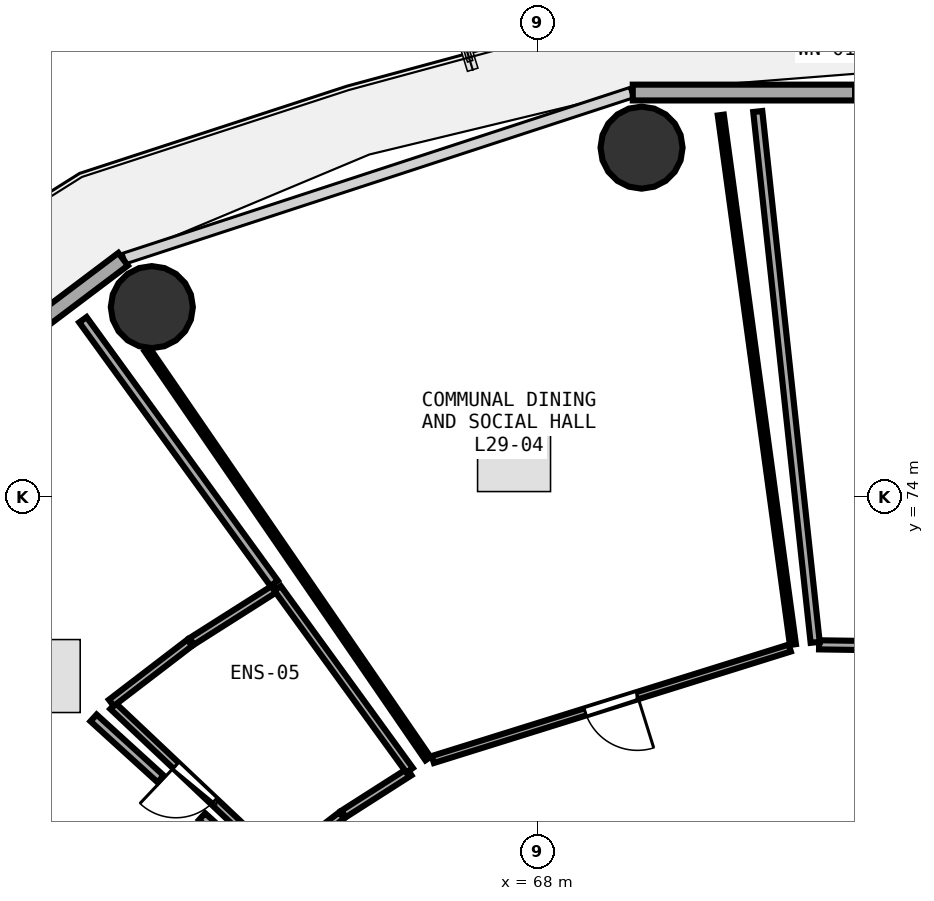
"""IFC4 building model, lengths in metres.
Left out: names, types, materials, properties, quantities, classifications, styles, units other than length and angle.
Written with IfcOpenShell. Run it as: python <this file> out.ifc"""

import sys

from ifc_helpers import new_model, si_unit, direction, frame, frame_2d, origin, origin_2d, place, context, subcontext, project, spatial, rectangle, circle, extrude, element, fill, save


model = new_model("IFC4")
c1 = context("Model", 3, precision=1e-05, world=origin(), true_north=direction((0.0, 1.0)))
c2 = subcontext(c1, "Body", "Model", "MODEL_VIEW")
j1 = project(units=[si_unit("LENGTHUNIT", "METRE"), si_unit("PLANEANGLEUNIT", "RADIAN")], contexts=[c1])
p1 = place(None, origin())
s1 = spatial("IfcSite", under=j1, at=p1, CompositionType="ELEMENT")
p2 = place(p1, origin())
s2 = spatial("IfcBuilding", under=s1, at=p2, CompositionType="ELEMENT")
p3 = place(p2, frame((0.0, 0.0, 113.85)))
s3 = spatial("IfcBuildingStorey", under=s2, at=p3, CompositionType="ELEMENT", Elevation=113.85)
for number, where, z_axis, x_axis in (
    (1, (69.714, 79.745, 0.0), (0.0, 0.0, 1.0), (1.0, 0.0, 0.0)),
    (2, (61.66, 77.122, 0.0), (0.0, 0.0, 1.0), (1.0, 0.0, 0.0)),
):
    element("IfcColumn", number, at=place(p3, frame(where, z_axis=z_axis, x_axis=x_axis)), inside=s3, PredefinedType="COLUMN", context=c2, shape_type="SweptSolid", body=[
        extrude(circle(Radius=0.675, at=origin_2d()), origin(), (0.0, 0.0, 1.0), 3.75),
    ])
p4 = place(p3, frame((78.43, 80.651, 0.0), z_axis=(0.0, 0.0, 1.0), x_axis=(-1.0, 0.0, 0.0)))
e3 = element("IfcWall", 3, at=p4, inside=s3, PredefinedType="SOLIDWALL", context=c2, shape_type="SweptSolid", body=[
    extrude(rectangle(XDim=8.861, YDim=0.26, at=frame_2d((4.43, 0.0))), origin(), (0.0, 0.0, 1.0), 3.475),
])
p5 = place(p4, frame((3.63, 0.0, 0.85)))
e4 = element("IfcOpeningElement", 4, at=p5, cuts=e3, PredefinedType="OPENING", context=c2, shape_type="SweptSolid", body=[
    extrude(rectangle(XDim=1.6, YDim=1.45, at=frame_2d((0.8, 0.725))), frame((0.0, 0.14, 0.0), z_axis=(0.0, -1.0, 0.0), x_axis=(1.0, 0.0, 0.0)), (0.0, 0.0, 1.0), 0.28),
])
p6 = place(p3, frame((61.188, 77.91, 0.0), z_axis=(0.0, 0.0, 1.0), x_axis=(-0.798501507879, -0.601992808857, 0.0)))
e5 = element("IfcWall", 5, at=p6, inside=s3, PredefinedType="SOLIDWALL", context=c2, shape_type="SweptSolid", body=[
    extrude(rectangle(XDim=8.499, YDim=0.26, at=frame_2d((4.25, 0.0))), origin(), (0.0, 0.0, 1.0), 3.475),
])
p7 = place(p6, frame((3.45, 0.0, 0.85)))
e6 = element("IfcOpeningElement", 6, at=p7, cuts=e5, PredefinedType="OPENING", context=c2, shape_type="SweptSolid", body=[
    extrude(rectangle(XDim=1.6, YDim=1.45, at=frame_2d((0.8, 0.725))), frame((0.0, 0.14, 0.0), z_axis=(0.0, -1.0, 0.0), x_axis=(1.0, 0.0, 0.0)), (0.0, 0.0, 1.0), 0.28),
])
p8 = place(p3, frame((75.856, 71.52, 0.0), z_axis=(0.0, 0.0, 1.0), x_axis=(-0.999888601473, 0.014925972152, 0.0)))
e7 = element("IfcWall", 7, at=p8, inside=s3, PredefinedType="PARTITIONING", context=c2, shape_type="SweptSolid", body=[
    extrude(rectangle(XDim=3.222, YDim=0.15, at=frame_2d((1.611, 0.0))), origin(), (0.0, 0.0, 1.0), 3.48),
])
p9 = place(p8, frame((1.136, 0.0, 0.0)))
e8 = element("IfcOpeningElement", 8, at=p9, cuts=e7, PredefinedType="OPENING", context=c2, shape_type="SweptSolid", body=[
    extrude(rectangle(XDim=0.95, YDim=2.08, at=frame_2d((0.475, 1.04))), frame((0.0, 0.085, 0.0), z_axis=(0.0, -1.0, 0.0), x_axis=(1.0, 0.0, 0.0)), (0.0, 0.0, 1.0), 0.17),
])
p10 = place(p3, frame((72.152, 71.515, 0.0), z_axis=(0.0, 0.0, 1.0), x_axis=(-0.954537176379, -0.298091896753, 0.0)))
e9 = element("IfcWall", 9, at=p10, inside=s3, PredefinedType="PARTITIONING", context=c2, shape_type="SweptSolid", body=[
    extrude(rectangle(XDim=6.15, YDim=0.12, at=frame_2d((3.075, 0.0))), origin(), (0.0, 0.0, 1.0), 2.925),
])
p11 = place(p10, frame((2.625, 0.0, 0.0)))
e10 = element("IfcOpeningElement", 10, at=p11, cuts=e9, PredefinedType="OPENING", context=c2, shape_type="SweptSolid", body=[
    extrude(rectangle(XDim=0.9, YDim=2.08, at=frame_2d((0.45, 1.04))), frame((0.0, 0.07, 0.0), z_axis=(0.0, -1.0, 0.0), x_axis=(1.0, 0.0, 0.0)), (0.0, 0.0, 1.0), 0.14),
])
p12 = place(p3, frame((63.714, 68.017, 0.0), z_axis=(0.0, 0.0, 1.0), x_axis=(-0.726954661445, 0.686685459438, 0.0)))
e11 = element("IfcWall", 11, at=p12, inside=s3, PredefinedType="PLUMBINGWALL", context=c2, shape_type="SweptSolid", body=[
    extrude(rectangle(XDim=3.704, YDim=0.13, at=frame_2d((1.852, 0.0))), origin(), (0.0, 0.0, 1.0), 3.175),
])
p13 = place(p12, frame((1.422, 0.0, 0.0)))
e12 = element("IfcOpeningElement", 12, at=p13, cuts=e11, PredefinedType="OPENING", context=c2, shape_type="SweptSolid", body=[
    extrude(rectangle(XDim=0.86, YDim=2.05, at=frame_2d((0.43, 1.025))), frame((0.0, 0.075, 0.0), z_axis=(0.0, -1.0, 0.0), x_axis=(1.0, 0.0, 0.0)), (0.0, 0.0, 1.0), 0.15),
])
p14 = place(p3, frame((72.57, 71.609, 0.0), z_axis=(0.0, 0.0, 1.0), x_axis=(-0.107541262508, 0.994200622037, 0.0)))
e13 = element("IfcWall", 13, at=p14, inside=s3, PredefinedType="PARTITIONING", context=c2, shape_type="SweptSolid", body=[
    extrude(rectangle(XDim=8.781, YDim=0.15, at=frame_2d((4.391, 0.0))), origin(), (0.0, 0.0, 1.0), 2.975),
])
p15 = place(p3, frame((66.201, 69.697, 0.0), z_axis=(0.0, 0.0, 1.0), x_axis=(-0.566050189738, 0.824370779866, 0.0)))
e14 = element("IfcWall", 14, at=p15, inside=s3, PredefinedType="PARTITIONING", context=c2, shape_type="SweptSolid", body=[
    extrude(rectangle(XDim=8.163, YDim=0.1, at=frame_2d((4.082, 0.0))), origin(), (0.0, 0.0, 1.0), 2.925),
])
p16 = place(p3, frame((71.017, 80.281, 0.0), z_axis=(0.0, 0.0, 1.0), x_axis=(0.134981799135, -0.990848078114, 0.0)))
e15 = element("IfcWall", 15, at=p16, inside=s3, PredefinedType="PARTITIONING", context=c2, shape_type="SweptSolid", body=[
    extrude(rectangle(XDim=8.788, YDim=0.1, at=frame_2d((4.394, 0.0))), origin(), (0.0, 0.0, 1.0), 2.975),
])
p17 = place(p3, frame((65.895, 69.477, 0.0), z_axis=(0.0, 0.0, 1.0), x_axis=(-0.842782601573, -0.538254109586, 0.0)))
e16 = element("IfcWall", 16, at=p17, inside=s3, PredefinedType="PLUMBINGWALL", context=c2, shape_type="SweptSolid", body=[
    extrude(rectangle(XDim=1.283, YDim=0.13, at=frame_2d((0.641, 0.0))), origin(), (0.0, 0.0, 1.0), 2.925),
])
p18 = place(p3, frame((64.781, 68.764, 0.0), z_axis=(0.0, 0.0, 1.0), x_axis=(-0.792402667756, -0.609998370599, 0.0)))
e17 = element("IfcWall", 17, at=p18, inside=s3, PredefinedType="PLUMBINGWALL", context=c2, shape_type="SweptSolid", body=[
    extrude(rectangle(XDim=1.271, YDim=0.13, at=frame_2d((0.636, 0.0))), origin(), (0.0, 0.0, 1.0), 2.925),
])
p19 = place(p3, frame((60.994, 70.614, 0.0), z_axis=(0.0, 0.0, 1.0), x_axis=(0.793879690019, 0.608074861982, 0.0)))
e18 = element("IfcWall", 18, at=p19, inside=s3, PredefinedType="PLUMBINGWALL", context=c2, shape_type="SweptSolid", body=[
    extrude(rectangle(XDim=1.624, YDim=0.13, at=frame_2d((0.812, 0.0))), origin(), (0.0, 0.0, 1.0), 3.175),
])
p20 = place(p3, frame((62.316, 71.625, 0.0), z_axis=(0.0, 0.0, 1.0), x_axis=(0.844446099651, 0.535640536913, 0.0)))
e19 = element("IfcWall", 19, at=p20, inside=s3, PredefinedType="PLUMBINGWALL", context=c2, shape_type="SweptSolid", body=[
    extrude(rectangle(XDim=1.638, YDim=0.13, at=frame_2d((0.819, 0.0))), origin(), (0.0, 0.0, 1.0), 2.925),
])
p21 = place(p3, frame((63.728, 72.497, 0.0), z_axis=(0.0, 0.0, 1.0), x_axis=(0.587484552708, -0.809235380053, 0.0)))
e20 = element("IfcWall", 20, at=p21, inside=s3, PredefinedType="PLUMBINGWALL", context=c2, shape_type="SweptSolid", body=[
    extrude(rectangle(XDim=3.698, YDim=0.13, at=frame_2d((1.849, 0.0))), origin(), (0.0, 0.0, 1.0), 3.175),
])
p22 = place(p3, frame((61.378, 65.469, 0.0), z_axis=(0.0, 0.0, 1.0), x_axis=(-0.867006010233, 0.498297680328, 0.0)))
e21 = element("IfcWall", 21, at=p22, inside=s3, PredefinedType="PARTITIONING", context=c2, shape_type="SweptSolid", body=[
    extrude(rectangle(XDim=9.627, YDim=0.15, at=frame_2d((4.813, 0.0))), origin(), (0.0, 0.0, 1.0), 2.975),
])
p23 = place(p3, frame((60.527, 76.915, 0.0), z_axis=(0.0, 0.0, 1.0), x_axis=(0.587181937274, -0.809454984875, 0.0)))
e22 = element("IfcWall", 22, at=p23, inside=s3, PredefinedType="PARTITIONING", context=c2, shape_type="SweptSolid", body=[
    extrude(rectangle(XDim=5.356, YDim=0.15, at=frame_2d((2.678, 0.0))), origin(), (0.0, 0.0, 1.0), 2.925),
])
p24 = place(p3, frame((60.702, 70.366, 0.0), z_axis=(0.0, 0.0, 1.0), x_axis=(0.739866002318, -0.67275426317, 0.0)))
e23 = element("IfcWall", 23, at=p24, inside=s3, PredefinedType="PARTITIONING", context=c2, shape_type="SweptSolid", body=[
    extrude(rectangle(XDim=1.491, YDim=0.15, at=frame_2d((0.746, 0.0))), origin(), (0.0, 0.0, 1.0), 3.175),
])
p25 = place(p3, frame((62.486, 68.744, 0.0), z_axis=(0.0, 0.0, 1.0), x_axis=(0.740107815143, -0.672488231841, 0.0)))
e24 = element("IfcWall", 24, at=p25, inside=s3, PredefinedType="PARTITIONING", context=c2, shape_type="SweptSolid", body=[
    extrude(rectangle(XDim=1.383, YDim=0.15, at=frame_2d((0.691, 0.0))), origin(), (0.0, 0.0, 1.0), 3.235),
])
p26 = place(p5, origin())
e25 = element("IfcWindow", 25, at=p26, inside=s3, PartitioningType="SINGLE_PANEL", PredefinedType="WINDOW", context=c2, shape_type="SweptSolid", body=[
    extrude(rectangle(XDim=1.6, YDim=1.45, at=frame_2d((0.8, 0.725))), frame((0.0, 0.03, 0.0), z_axis=(0.0, -1.0, 0.0), x_axis=(1.0, 0.0, 0.0)), (0.0, 0.0, 1.0), 0.06),
])
fill(e4, e25)
p27 = place(p11, origin())
e26 = element("IfcDoor", 26, at=p27, inside=s3, OperationType="SINGLE_SWING_LEFT", PredefinedType="DOOR", context=c2, shape_type="SweptSolid", body=[
    extrude(rectangle(XDim=0.9, YDim=2.08, at=frame_2d((0.45, 1.04))), frame((0.0, 0.025, 0.0), z_axis=(0.0, -1.0, 0.0), x_axis=(1.0, 0.0, 0.0)), (0.0, 0.0, 1.0), 0.05),
])
fill(e10, e26)
p28 = place(p13, origin())
e27 = element("IfcDoor", 27, at=p28, inside=s3, OperationType="SINGLE_SWING_RIGHT", PredefinedType="DOOR", context=c2, shape_type="SweptSolid", body=[
    extrude(rectangle(XDim=0.86, YDim=2.05, at=frame_2d((0.43, 1.025))), frame((0.0, 0.025, 0.0), z_axis=(0.0, -1.0, 0.0), x_axis=(1.0, 0.0, 0.0)), (0.0, 0.0, 1.0), 0.05),
])
fill(e12, e27)
save(model, sys.argv[1])
